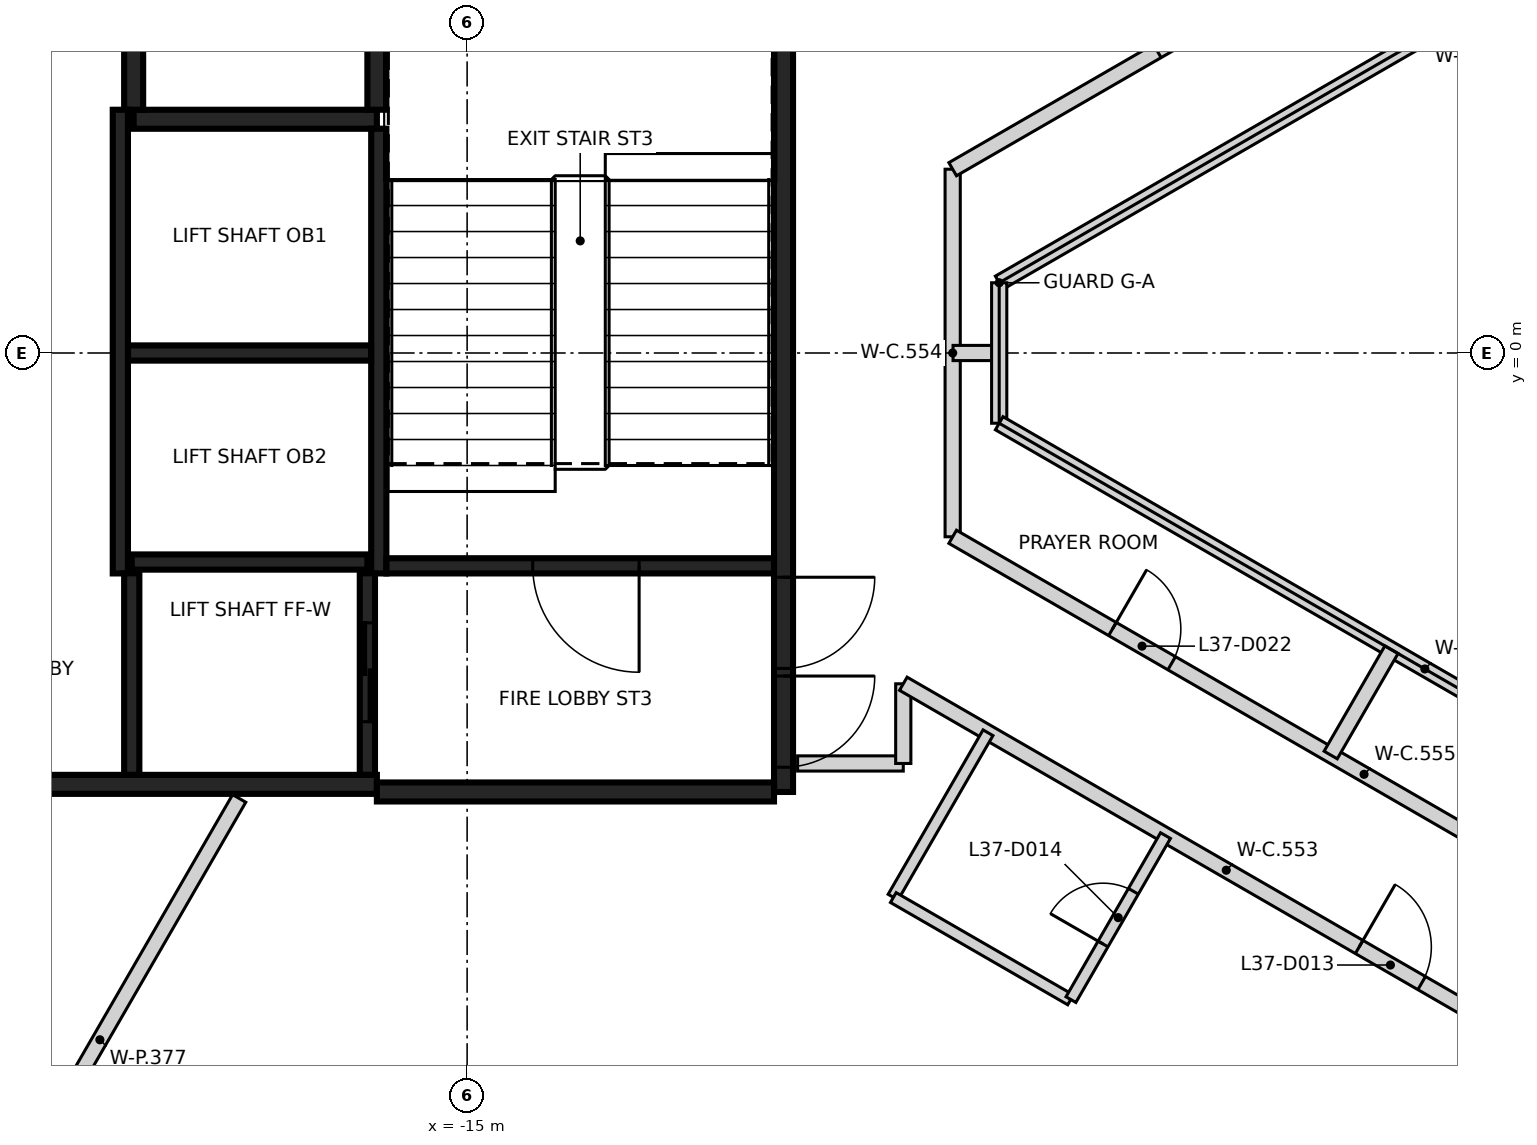
"""IFC4 building model, lengths in metres.
Left out: names, types, materials, properties, quantities, classifications, styles, units other than length and angle.
Written with IfcOpenShell. Run it as: python <this file> out.ifc"""

import sys

from ifc_helpers import new_model, si_unit, direction, frame, frame_2d, origin, place, context, subcontext, project, spatial, rectangle, extrude, element, fill, save


model = new_model("IFC4")
c1 = context("Model", 3, precision=1e-05, world=origin(), true_north=direction((0.0, 1.0)))
c2 = subcontext(c1, "Body", "Model", "MODEL_VIEW")
j1 = project(units=[si_unit("LENGTHUNIT", "METRE"), si_unit("PLANEANGLEUNIT", "RADIAN")], contexts=[c1])
p1 = place(None, origin())
s1 = spatial("IfcSite", under=j1, at=p1, CompositionType="ELEMENT")
p2 = place(p1, origin())
s2 = spatial("IfcBuilding", under=s1, at=p2, CompositionType="ELEMENT")
p3 = place(p2, frame((0.0, 0.0, 150.4)))
s3 = spatial("IfcBuildingStorey", under=s2, at=p3, CompositionType="ELEMENT", Elevation=150.4)
p4 = place(p3, frame((-10.837, 5.775, 0.0), z_axis=(0.0, 0.0, 1.0), x_axis=(0.0, -1.0, 0.0)))
e1 = element("IfcWall", 1, at=p4, inside=s3, PredefinedType="SHEAR", context=c2, shape_type="SweptSolid", body=[
    extrude(rectangle(XDim=11.55, YDim=0.25, at=frame_2d((5.775, 0.0))), origin(), (0.0, 0.0, 1.0), 3.2),
])
p5 = place(p4, frame((10.025, 0.0, 0.0)))
e2 = element("IfcOpeningElement", 2, at=p5, cuts=e1, PredefinedType="OPENING", context=c2, shape_type="SweptSolid", body=[
    extrude(rectangle(XDim=1.2, YDim=2.1, at=frame_2d((0.6, 1.05))), frame((0.0, 0.135, 0.0), z_axis=(0.0, -1.0, 0.0), x_axis=(1.0, 0.0, 0.0)), (0.0, 0.0, 1.0), 0.27),
])
p6 = place(p4, frame((8.725, 0.0, 0.0)))
e3 = element("IfcOpeningElement", 3, at=p6, cuts=e1, PredefinedType="OPENING", context=c2, shape_type="SweptSolid", body=[
    extrude(rectangle(XDim=1.2, YDim=2.1, at=frame_2d((0.6, 1.05))), frame((0.0, 0.135, 0.0), z_axis=(0.0, -1.0, 0.0), x_axis=(1.0, 0.0, 0.0)), (0.0, 0.0, 1.0), 0.27),
])
p7 = place(p3, frame((-16.187, -5.675, 0.0), z_axis=(0.0, 0.0, 1.0), x_axis=(-1.0, 0.0, 0.0)))
e4 = element("IfcWall", 4, at=p7, inside=s3, PredefinedType="SHEAR", context=c2, shape_type="SweptSolid", body=[
    extrude(rectangle(XDim=6.25, YDim=0.25, at=frame_2d((3.125, 0.0))), origin(), (0.0, 0.0, 1.0), 3.2),
])
p8 = place(p3, frame((-10.963, -5.775, 0.0), z_axis=(0.0, 0.0, 1.0), x_axis=(-1.0, 0.0, 0.0)))
e5 = element("IfcWall", 5, at=p8, inside=s3, PredefinedType="SHEAR", context=c2, shape_type="SweptSolid", body=[
    extrude(rectangle(XDim=5.225, YDim=0.25, at=frame_2d((2.612, 0.0))), origin(), (0.0, 0.0, 1.0), 3.2),
])
p9 = place(p3, frame((-19.387, 3.075, 0.0), z_axis=(0.0, 0.0, 1.0), x_axis=(1.0, 0.0, 0.0)))
e6 = element("IfcWall", 6, at=p9, inside=s3, PredefinedType="SHEAR", context=c2, shape_type="SweptSolid", body=[
    extrude(rectangle(XDim=3.2, YDim=0.25, at=frame_2d((1.6, 0.0))), origin(), (0.0, 0.0, 1.0), 3.2),
])
p10 = place(p3, frame((-16.187, 3.2, 0.0), z_axis=(0.0, 0.0, 1.0), x_axis=(0.0, 1.0, 0.0)))
e7 = element("IfcWall", 7, at=p10, inside=s3, PredefinedType="SHEAR", context=c2, shape_type="SweptSolid", body=[
    extrude(rectangle(XDim=2.449, YDim=0.25, at=frame_2d((1.225, 0.0))), origin(), (0.0, 0.0, 1.0), 3.2),
])
p11 = place(p3, frame((-19.387, 4.19, 0.0), z_axis=(0.0, 0.0, 1.0), x_axis=(0.0, -1.0, 0.0)))
e8 = element("IfcWall", 8, at=p11, inside=s3, PredefinedType="SHEAR", context=c2, shape_type="SweptSolid", body=[
    extrude(rectangle(XDim=0.989, YDim=0.25, at=frame_2d((0.495, 0.0))), origin(), (0.0, 0.0, 1.0), 3.2),
])
p12 = place(p3, frame((-16.162, 2.951, 0.0), z_axis=(0.0, 0.0, 1.0), x_axis=(0.0, -1.0, 0.0)))
e9 = element("IfcWall", 9, at=p12, inside=s3, PredefinedType="SHEAR", context=c2, shape_type="SweptSolid", body=[
    extrude(rectangle(XDim=5.851, YDim=0.2, at=frame_2d((2.925, 0.0))), origin(), (0.0, 0.0, 1.0), 3.2),
])
p13 = place(p3, frame((-19.562, -2.9, 0.0), z_axis=(0.0, 0.0, 1.0), x_axis=(0.0, 1.0, 0.0)))
e10 = element("IfcWall", 10, at=p13, inside=s3, PredefinedType="SHEAR", context=c2, shape_type="SweptSolid", body=[
    extrude(rectangle(XDim=6.1, YDim=0.2, at=frame_2d((3.05, 0.0))), origin(), (0.0, 0.0, 1.0), 3.2),
])
p14 = place(p3, frame((-10.963, -2.8, 0.0), z_axis=(0.0, 0.0, 1.0), x_axis=(-1.0, 0.0, 0.0)))
e11 = element("IfcWall", 11, at=p14, inside=s3, PredefinedType="SHEAR", context=c2, shape_type="SweptSolid", body=[
    extrude(rectangle(XDim=5.098, YDim=0.2, at=frame_2d((2.549, 0.0))), origin(), (0.0, 0.0, 1.0), 3.2),
])
p15 = place(p14, frame((1.774, 0.0, 0.0)))
e12 = element("IfcOpeningElement", 12, at=p15, cuts=e11, PredefinedType="OPENING", context=c2, shape_type="SweptSolid", body=[
    extrude(rectangle(XDim=1.4, YDim=2.1, at=frame_2d((0.7, 1.05))), frame((0.0, 0.11, 0.0), z_axis=(0.0, -1.0, 0.0), x_axis=(1.0, 0.0, 0.0)), (0.0, 0.0, 1.0), 0.22),
])
p16 = place(p3, frame((-16.263, 0.0, 0.0), z_axis=(0.0, 0.0, 1.0), x_axis=(-1.0, 0.0, 0.0)))
e13 = element("IfcWall", 13, at=p16, inside=s3, PredefinedType="SHEAR", context=c2, shape_type="SweptSolid", body=[
    extrude(rectangle(XDim=3.198, YDim=0.2, at=frame_2d((1.599, 0.0))), origin(), (0.0, 0.0, 1.0), 3.2),
])
p17 = place(p3, frame((-19.412, -2.75, 0.0), z_axis=(0.0, 0.0, 1.0), x_axis=(1.0, 0.0, 0.0)))
e14 = element("IfcWall", 14, at=p17, inside=s3, PredefinedType="SHEAR", context=c2, shape_type="SweptSolid", body=[
    extrude(rectangle(XDim=3.1, YDim=0.2, at=frame_2d((1.55, 0.0))), origin(), (0.0, 0.0, 1.0), 3.2),
])
p18 = place(p3, frame((-16.312, -2.898, 0.0), z_axis=(0.0, 0.0, 1.0), x_axis=(0.0, -1.0, 0.0)))
e15 = element("IfcWall", 15, at=p18, inside=s3, PredefinedType="SHEAR", context=c2, shape_type="SweptSolid", body=[
    extrude(rectangle(XDim=2.651, YDim=0.2, at=frame_2d((1.325, 0.0))), origin(), (0.0, 0.0, 1.0), 3.2),
])
p19 = place(p18, frame((0.652, 0.0, 0.0)))
e16 = element("IfcOpeningElement", 16, at=p19, cuts=e15, PredefinedType="OPENING", context=c2, shape_type="SweptSolid", body=[
    extrude(rectangle(XDim=1.3, YDim=2.1, at=frame_2d((0.65, 1.05))), frame((0.0, 0.11, 0.0), z_axis=(0.0, -1.0, 0.0), x_axis=(1.0, 0.0, 0.0)), (0.0, 0.0, 1.0), 0.22),
])
p20 = place(p3, frame((-19.412, -5.549, 0.0), z_axis=(0.0, 0.0, 1.0), x_axis=(0.0, 1.0, 0.0)))
e17 = element("IfcWall", 17, at=p20, inside=s3, PredefinedType="SHEAR", context=c2, shape_type="SweptSolid", body=[
    extrude(rectangle(XDim=2.651, YDim=0.2, at=frame_2d((1.325, 0.0))), origin(), (0.0, 0.0, 1.0), 3.2),
])
p21 = place(p3, frame((-10.652, -5.4, 0.0), z_axis=(0.0, 0.0, 1.0), x_axis=(1.0, 0.0, 0.0)))
e18 = element("IfcWall", 18, at=p21, inside=s3, PredefinedType="PARTITIONING", context=c2, shape_type="SweptSolid", body=[
    extrude(rectangle(XDim=1.39, YDim=0.2, at=frame_2d((0.695, 0.0))), origin(), (0.0, 0.0, 1.0), 3.2),
])
p22 = place(p3, frame((-9.262, -5.4, 0.0), z_axis=(0.0, 0.0, 1.0), x_axis=(0.0, 1.0, 0.0)))
e19 = element("IfcWall", 19, at=p22, inside=s3, PredefinedType="PARTITIONING", context=c2, shape_type="SweptSolid", body=[
    extrude(rectangle(XDim=1.048, YDim=0.2, at=frame_2d((0.524, 0.0))), origin(), (0.0, 0.0, 1.0), 3.2),
])
p23 = place(p3, frame((-9.261, -4.351, 0.0), z_axis=(0.0, 0.0, 1.0), x_axis=(0.865985037707, -0.500069909581, 0.0)))
e20 = element("IfcWall", 20, at=p23, inside=s3, PredefinedType="PARTITIONING", context=c2, shape_type="SweptSolid", body=[
    extrude(rectangle(XDim=9.812, YDim=0.2, at=frame_2d((4.906, 0.0))), origin(), (0.0, 0.0, 1.0), 3.2),
])
p24 = place(p23, frame((6.925, 0.0, 0.0)))
e21 = element("IfcOpeningElement", 21, at=p24, cuts=e20, PredefinedType="OPENING", context=c2, shape_type="SweptSolid", body=[
    extrude(rectangle(XDim=0.95, YDim=2.1, at=frame_2d((0.475, 1.05))), frame((0.0, 0.11, 0.0), z_axis=(0.0, -1.0, 0.0), x_axis=(1.0, 0.0, 0.0)), (0.0, 0.0, 1.0), 0.22),
])
p25 = place(p3, frame((-8.612, -2.418, 0.0), z_axis=(0.0, 0.0, 1.0), x_axis=(0.0, 1.0, 0.0)))
e22 = element("IfcWall", 22, at=p25, inside=s3, PredefinedType="PARTITIONING", context=c2, shape_type="SweptSolid", body=[
    extrude(rectangle(XDim=4.836, YDim=0.2, at=frame_2d((2.418, 0.0))), origin(), (0.0, 0.0, 1.0), 2.3),
])
p26 = place(p3, frame((-8.612, -2.418, 0.0), z_axis=(0.0, 0.0, 1.0), x_axis=(0.866023916678, -0.500002575735, 0.0)))
e23 = element("IfcWall", 23, at=p26, inside=s3, PredefinedType="PARTITIONING", context=c2, shape_type="SweptSolid", body=[
    extrude(rectangle(XDim=12.499, YDim=0.2, at=frame_2d((6.249, 0.0))), origin(), (0.0, 0.0, 1.0), 3.2),
])
p27 = place(p26, frame((2.427, 0.0, 0.0)))
e24 = element("IfcOpeningElement", 24, at=p27, cuts=e23, PredefinedType="OPENING", context=c2, shape_type="SweptSolid", body=[
    extrude(rectangle(XDim=0.9, YDim=2.1, at=frame_2d((0.45, 1.05))), frame((0.0, 0.11, 0.0), z_axis=(0.0, -1.0, 0.0), x_axis=(1.0, 0.0, 0.0)), (0.0, 0.0, 1.0), 0.22),
])
p28 = place(p26, frame((8.665, 0.0, 0.0)))
e25 = element("IfcOpeningElement", 25, at=p28, cuts=e23, PredefinedType="OPENING", context=c2, shape_type="SweptSolid", body=[
    extrude(rectangle(XDim=0.9, YDim=2.1, at=frame_2d((0.45, 1.05))), frame((0.0, 0.11, 0.0), z_axis=(0.0, -1.0, 0.0), x_axis=(1.0, 0.0, 0.0)), (0.0, 0.0, 1.0), 0.22),
])
p29 = place(p3, frame((-8.612, 2.418, 0.0), z_axis=(0.0, 0.0, 1.0), x_axis=(0.866019033094, 0.500011034197, 0.0)))
e26 = element("IfcWall", 26, at=p29, inside=s3, PredefinedType="PARTITIONING", context=c2, shape_type="SweptSolid", body=[
    extrude(rectangle(XDim=12.498, YDim=0.2, at=frame_2d((6.249, 0.0))), origin(), (0.0, 0.0, 1.0), 3.2),
])
p30 = place(p29, frame((9.346, 0.0, 0.0)))
e27 = element("IfcOpeningElement", 27, at=p30, cuts=e26, PredefinedType="OPENING", context=c2, shape_type="SweptSolid", body=[
    extrude(rectangle(XDim=0.9, YDim=2.1, at=frame_2d((0.45, 1.05))), frame((0.0, 0.11, 0.0), z_axis=(0.0, -1.0, 0.0), x_axis=(1.0, 0.0, 0.0)), (0.0, 0.0, 1.0), 0.22),
])
p31 = place(p29, frame((3.109, 0.0, 0.0)))
e28 = element("IfcOpeningElement", 28, at=p31, cuts=e26, PredefinedType="OPENING", context=c2, shape_type="SweptSolid", body=[
    extrude(rectangle(XDim=0.9, YDim=2.1, at=frame_2d((0.45, 1.05))), frame((0.0, 0.11, 0.0), z_axis=(0.0, -1.0, 0.0), x_axis=(1.0, 0.0, 0.0)), (0.0, 0.0, 1.0), 0.22),
])
p32 = place(p3, frame((-2.162, -12.041, 0.0), z_axis=(0.0, 0.0, 1.0), x_axis=(0.448937335771, 0.893563242614, 0.0)))
e29 = element("IfcWall", 29, at=p32, inside=s3, PredefinedType="PARTITIONING", context=c2, shape_type="SweptSolid", body=[
    extrude(rectangle(XDim=3.115, YDim=0.2, at=frame_2d((1.557, 0.0))), origin(), (0.0, 0.0, 1.0), 3.2),
])
p33 = place(p3, frame((-21.664, -12.21, 0.0), z_axis=(0.0, 0.0, 1.0), x_axis=(0.499938621367, 0.866060837855, 0.0)))
e30 = element("IfcWall", 30, at=p33, inside=s3, PredefinedType="PARTITIONING", context=c2, shape_type="SweptSolid", body=[
    extrude(rectangle(XDim=7.333, YDim=0.2, at=frame_2d((3.666, 0.0))), origin(), (0.0, 0.0, 1.0), 2.3),
])
p34 = place(p3, frame((-8.607, 0.0, 0.0), z_axis=(0.0, 0.0, 1.0), x_axis=(1.0, 0.0, 0.0)))
e31 = element("IfcWall", 31, at=p34, inside=s3, PredefinedType="PARTITIONING", context=c2, shape_type="SweptSolid", body=[
    extrude(rectangle(XDim=0.607, YDim=0.2, at=frame_2d((0.303, 0.0))), origin(), (0.0, 0.0, 1.0), 2.3),
])
p35 = place(p3, frame((-8.0, 0.925, 0.0), z_axis=(0.0, 0.0, 1.0), x_axis=(0.866075250037, 0.499913653818, 0.0)))
e32 = element("IfcWall", 32, at=p35, inside=s3, PredefinedType="PARTITIONING", context=c2, shape_type="SweptSolid", body=[
    extrude(rectangle(XDim=12.932, YDim=0.2, at=frame_2d((6.466, 0.0))), origin(), (0.0, 0.0, 1.0), 2.3),
])
p36 = place(p3, frame((-8.0, -0.924, 0.0), z_axis=(0.0, 0.0, 1.0), x_axis=(0.0, 1.0, 0.0)))
e33 = element("IfcWall", 33, at=p36, inside=s3, PredefinedType="PARTITIONING", context=c2, shape_type="SweptSolid", body=[
    extrude(rectangle(XDim=1.848, YDim=0.2, at=frame_2d((0.924, 0.0))), origin(), (0.0, 0.0, 1.0), 2.3),
])
p37 = place(p3, frame((-8.0, -0.924, 0.0), z_axis=(0.0, 0.0, 1.0), x_axis=(0.866062358179, -0.499935987647, 0.0)))
e34 = element("IfcWall", 34, at=p37, inside=s3, PredefinedType="PARTITIONING", context=c2, shape_type="SweptSolid", body=[
    extrude(rectangle(XDim=12.932, YDim=0.2, at=frame_2d((6.466, 0.0))), origin(), (0.0, 0.0, 1.0), 2.3),
])
p38 = place(p3, frame((-3.639, -5.289, 0.0), z_axis=(0.0, 0.0, 1.0), x_axis=(0.49981490623, 0.866132241352, 0.0)))
e35 = element("IfcWall", 35, at=p38, inside=s3, PredefinedType="PARTITIONING", context=c2, shape_type="SweptSolid", body=[
    extrude(rectangle(XDim=1.6, YDim=0.2, at=frame_2d((0.8, 0.0))), origin(), (0.0, 0.0, 1.0), 2.3),
])
p39 = place(p3, frame((-9.396, -7.159, 0.0), z_axis=(0.0, 0.0, 1.0), x_axis=(0.500091929049, 0.865972322018, 0.0)))
e36 = element("IfcWall", 36, at=p39, inside=s3, PredefinedType="PARTITIONING", context=c2, shape_type="SweptSolid", body=[
    extrude(rectangle(XDim=2.498, YDim=0.15, at=frame_2d((1.249, 0.0))), origin(), (0.0, 0.0, 1.0), 3.2),
])
p40 = place(p3, frame((-9.393, -7.164, 0.0), z_axis=(0.0, 0.0, 1.0), x_axis=(0.866098020528, -0.499874203012, 0.0)))
e37 = element("IfcWall", 37, at=p40, inside=s3, PredefinedType="PARTITIONING", context=c2, shape_type="SweptSolid", body=[
    extrude(rectangle(XDim=2.693, YDim=0.15, at=frame_2d((1.346, 0.0))), origin(), (0.0, 0.0, 1.0), 3.2),
])
p41 = place(p3, frame((-7.056, -8.507, 0.0), z_axis=(0.0, 0.0, 1.0), x_axis=(0.499397145068, 0.866373182582, 0.0)))
e38 = element("IfcWall", 38, at=p41, inside=s3, PredefinedType="PARTITIONING", context=c2, shape_type="SweptSolid", body=[
    extrude(rectangle(XDim=2.491, YDim=0.15, at=frame_2d((1.245, 0.0))), origin(), (0.0, 0.0, 1.0), 3.2),
])
p42 = place(p41, frame((0.845, 0.0, 0.0)))
e39 = element("IfcOpeningElement", 39, at=p42, cuts=e38, PredefinedType="OPENING", context=c2, shape_type="SweptSolid", body=[
    extrude(rectangle(XDim=0.8, YDim=2.1, at=frame_2d((0.4, 1.05))), frame((0.0, 0.085, 0.0), z_axis=(0.0, -1.0, 0.0), x_axis=(1.0, 0.0, 0.0)), (0.0, 0.0, 1.0), 0.17),
])
p43 = place(p19, origin())
e40 = element("IfcDoor", 40, at=p43, inside=s3, OperationType="SLIDING_TO_LEFT", PredefinedType="DOOR", context=c2, shape_type="SweptSolid", body=[
    extrude(rectangle(XDim=1.3, YDim=2.1, at=frame_2d((0.65, 1.05))), frame((0.0, 0.025, 0.0), z_axis=(0.0, -1.0, 0.0), x_axis=(1.0, 0.0, 0.0)), (0.0, 0.0, 1.0), 0.05),
])
fill(e16, e40)
p44 = place(p5, origin())
e41 = element("IfcDoor", 41, at=p44, inside=s3, OperationType="SINGLE_SWING_LEFT", PredefinedType="DOOR", context=c2, shape_type="SweptSolid", body=[
    extrude(rectangle(XDim=1.2, YDim=2.1, at=frame_2d((0.6, 1.05))), frame((0.0, 0.025, 0.0), z_axis=(0.0, -1.0, 0.0), x_axis=(1.0, 0.0, 0.0)), (0.0, 0.0, 1.0), 0.05),
])
fill(e2, e41)
p45 = place(p6, origin())
e42 = element("IfcDoor", 42, at=p45, inside=s3, OperationType="SINGLE_SWING_RIGHT", PredefinedType="DOOR", context=c2, shape_type="SweptSolid", body=[
    extrude(rectangle(XDim=1.2, YDim=2.1, at=frame_2d((0.6, 1.05))), frame((0.0, 0.025, 0.0), z_axis=(0.0, -1.0, 0.0), x_axis=(1.0, 0.0, 0.0)), (0.0, 0.0, 1.0), 0.05),
])
fill(e3, e42)
p46 = place(p15, origin())
e43 = element("IfcDoor", 43, at=p46, inside=s3, OperationType="SINGLE_SWING_LEFT", PredefinedType="DOOR", context=c2, shape_type="SweptSolid", body=[
    extrude(rectangle(XDim=1.4, YDim=2.1, at=frame_2d((0.7, 1.05))), frame((0.0, 0.025, 0.0), z_axis=(0.0, -1.0, 0.0), x_axis=(1.0, 0.0, 0.0)), (0.0, 0.0, 1.0), 0.05),
])
fill(e12, e43)
p47 = place(p24, frame((0.95, 0.0, 0.0), z_axis=(0.0, 0.0, 1.0), x_axis=(-1.0, 0.0, 0.0)))
e44 = element("IfcDoor", 44, at=p47, inside=s3, OperationType="SINGLE_SWING_LEFT", PredefinedType="DOOR", context=c2, shape_type="SweptSolid", body=[
    extrude(rectangle(XDim=0.95, YDim=2.1, at=frame_2d((0.475, 1.05))), frame((0.0, 0.025, 0.0), z_axis=(0.0, -1.0, 0.0), x_axis=(1.0, 0.0, 0.0)), (0.0, 0.0, 1.0), 0.05),
])
fill(e21, e44)
p48 = place(p42, origin())
e45 = element("IfcDoor", 45, at=p48, inside=s3, OperationType="SINGLE_SWING_LEFT", PredefinedType="DOOR", context=c2, shape_type="SweptSolid", body=[
    extrude(rectangle(XDim=0.8, YDim=2.1, at=frame_2d((0.4, 1.05))), frame((0.0, 0.025, 0.0), z_axis=(0.0, -1.0, 0.0), x_axis=(1.0, 0.0, 0.0)), (0.0, 0.0, 1.0), 0.05),
])
fill(e39, e45)
p49 = place(p27, origin())
e46 = element("IfcDoor", 46, at=p49, inside=s3, OperationType="SINGLE_SWING_LEFT", PredefinedType="DOOR", context=c2, shape_type="SweptSolid", body=[
    extrude(rectangle(XDim=0.9, YDim=2.1, at=frame_2d((0.45, 1.05))), frame((0.0, 0.025, 0.0), z_axis=(0.0, -1.0, 0.0), x_axis=(1.0, 0.0, 0.0)), (0.0, 0.0, 1.0), 0.05),
])
fill(e24, e46)
save(model, sys.argv[1])
